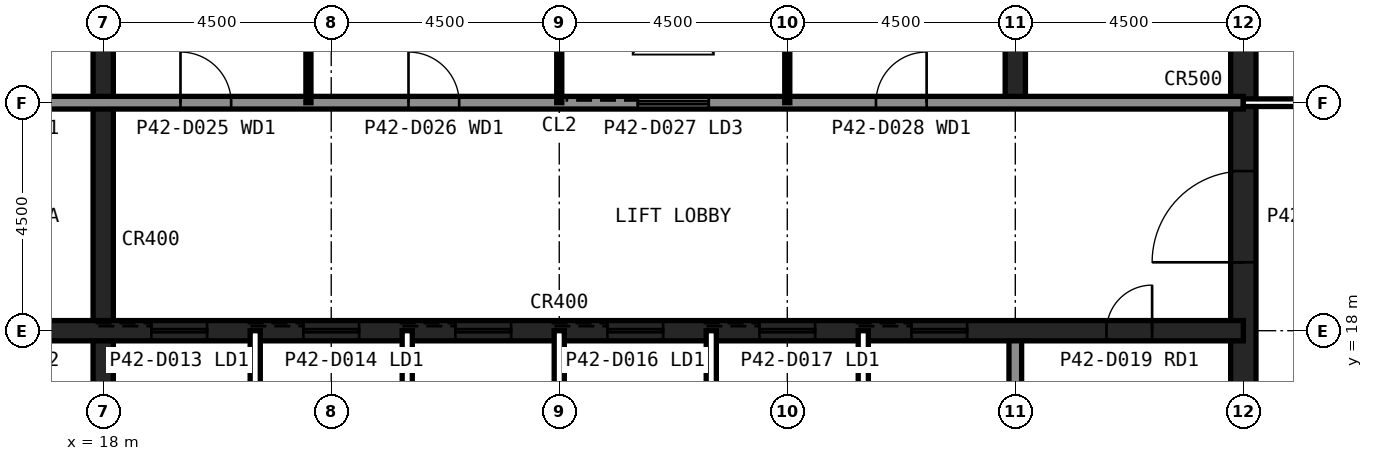
"""IFC4 building model, lengths in metres.
Left out: names, types, materials, properties, quantities, classifications, styles, units other than length and angle.
Written with IfcOpenShell. Run it as: python <this file> out.ifc"""

import sys

from ifc_helpers import new_model, si_unit, direction, frame, frame_2d, origin, place, context, subcontext, project, spatial, rectangle, extrude, element, fill, save


model = new_model("IFC4")
c1 = context("Model", 3, precision=1e-05, world=origin(), true_north=direction((0.0, 1.0)))
c2 = subcontext(c1, "Body", "Model", "MODEL_VIEW")
j1 = project(units=[si_unit("LENGTHUNIT", "METRE"), si_unit("PLANEANGLEUNIT", "RADIAN")], contexts=[c1])
p1 = place(None, origin())
s1 = spatial("IfcSite", under=j1, at=p1, CompositionType="ELEMENT")
p2 = place(p1, origin())
s2 = spatial("IfcBuilding", under=s1, at=p2, CompositionType="ELEMENT")
p3 = place(p2, frame((0.0, 0.0, 175.6)))
s3 = spatial("IfcBuildingStorey", under=s2, at=p3, CompositionType="ELEMENT", Elevation=175.6)
p4 = place(p3, frame((40.5, 13.5, 0.0), z_axis=(0.0, 0.0, 1.0), x_axis=(0.0, 1.0, 0.0)))
e1 = element("IfcWall", 1, at=p4, inside=s3, PredefinedType="SHEAR", context=c2, shape_type="SweptSolid", body=[
    extrude(rectangle(XDim=27.0, YDim=0.5, at=frame_2d((13.5, 0.0))), origin(), (0.0, 0.0, 1.0), 4.0),
])
p5 = place(p4, frame((5.85, 0.0, 0.0)))
e2 = element("IfcOpeningElement", 2, at=p5, cuts=e1, PredefinedType="OPENING", context=c2, shape_type="SweptSolid", body=[
    extrude(rectangle(XDim=1.8, YDim=2.1, at=frame_2d((0.9, 1.05))), frame((0.0, 0.26, 0.0), z_axis=(0.0, -1.0, 0.0), x_axis=(1.0, 0.0, 0.0)), (0.0, 0.0, 1.0), 0.52),
])
p6 = place(p4, frame((19.65, 0.0, 0.0)))
e3 = element("IfcOpeningElement", 3, at=p6, cuts=e1, PredefinedType="OPENING", context=c2, shape_type="SweptSolid", body=[
    extrude(rectangle(XDim=1.2, YDim=2.1, at=frame_2d((0.6, 1.05))), frame((0.0, 0.26, 0.0), z_axis=(0.0, -1.0, 0.0), x_axis=(1.0, 0.0, 0.0)), (0.0, 0.0, 1.0), 0.52),
])
p7 = place(p3, frame((18.0, 13.5, 0.0), z_axis=(0.0, 0.0, 1.0), x_axis=(0.0, 1.0, 0.0)))
e4 = element("IfcWall", 4, at=p7, inside=s3, PredefinedType="SHEAR", context=c2, shape_type="SweptSolid", body=[
    extrude(rectangle(XDim=18.0, YDim=0.4, at=frame_2d((9.0, 0.0))), origin(), (0.0, 0.0, 1.0), 4.0),
])
p8 = place(p3, frame((36.0, 13.5, 0.0), z_axis=(0.0, 0.0, 1.0), x_axis=(0.0, 1.0, 0.0)))
e5 = element("IfcWall", 5, at=p8, inside=s3, PredefinedType="SOLIDWALL", context=c2, shape_type="SweptSolid", body=[
    extrude(rectangle(XDim=4.5, YDim=0.25, at=frame_2d((2.25, 0.0))), origin(), (0.0, 0.0, 1.0), 3.84),
])
p9 = place(p3, frame((36.0, 22.5, 0.0), z_axis=(0.0, 0.0, 1.0), x_axis=(0.0, 1.0, 0.0)))
e6 = element("IfcWall", 6, at=p9, inside=s3, PredefinedType="SHEAR", context=c2, shape_type="SweptSolid", body=[
    extrude(rectangle(XDim=18.0, YDim=0.4, at=frame_2d((9.0, 0.0))), origin(), (0.0, 0.0, 1.0), 4.0),
])
p10 = place(p3, frame((13.5, 18.0, 0.0), z_axis=(0.0, 0.0, 1.0), x_axis=(1.0, 0.0, 0.0)))
e7 = element("IfcWall", 7, at=p10, inside=s3, PredefinedType="SHEAR", context=c2, shape_type="SweptSolid", body=[
    extrude(rectangle(XDim=27.0, YDim=0.4, at=frame_2d((13.5, 0.0))), origin(), (0.0, 0.0, 1.0), 4.0),
])
p11 = place(p10, frame((24.3, 0.0, 0.0)))
e8 = element("IfcOpeningElement", 8, at=p11, cuts=e7, PredefinedType="OPENING", context=c2, shape_type="SweptSolid", body=[
    extrude(rectangle(XDim=0.9, YDim=2.1, at=frame_2d((0.45, 1.05))), frame((0.0, 0.21, 0.0), z_axis=(0.0, -1.0, 0.0), x_axis=(1.0, 0.0, 0.0)), (0.0, 0.0, 1.0), 0.42),
])
p12 = place(p10, frame((5.45, 0.0, 0.0)))
e9 = element("IfcOpeningElement", 9, at=p12, cuts=e7, PredefinedType="OPENING", context=c2, shape_type="SweptSolid", body=[
    extrude(rectangle(XDim=1.1, YDim=2.1, at=frame_2d((0.55, 1.05))), frame((0.0, 0.21, 0.0), z_axis=(0.0, -1.0, 0.0), x_axis=(1.0, 0.0, 0.0)), (0.0, 0.0, 1.0), 0.42),
])
p13 = place(p10, frame((8.45, 0.0, 0.0)))
e10 = element("IfcOpeningElement", 10, at=p13, cuts=e7, PredefinedType="OPENING", context=c2, shape_type="SweptSolid", body=[
    extrude(rectangle(XDim=1.1, YDim=2.1, at=frame_2d((0.55, 1.05))), frame((0.0, 0.21, 0.0), z_axis=(0.0, -1.0, 0.0), x_axis=(1.0, 0.0, 0.0)), (0.0, 0.0, 1.0), 0.42),
])
p14 = place(p10, frame((11.45, 0.0, 0.0)))
e11 = element("IfcOpeningElement", 11, at=p14, cuts=e7, PredefinedType="OPENING", context=c2, shape_type="SweptSolid", body=[
    extrude(rectangle(XDim=1.1, YDim=2.1, at=frame_2d((0.55, 1.05))), frame((0.0, 0.21, 0.0), z_axis=(0.0, -1.0, 0.0), x_axis=(1.0, 0.0, 0.0)), (0.0, 0.0, 1.0), 0.42),
])
p15 = place(p10, frame((14.45, 0.0, 0.0)))
e12 = element("IfcOpeningElement", 12, at=p15, cuts=e7, PredefinedType="OPENING", context=c2, shape_type="SweptSolid", body=[
    extrude(rectangle(XDim=1.1, YDim=2.1, at=frame_2d((0.55, 1.05))), frame((0.0, 0.21, 0.0), z_axis=(0.0, -1.0, 0.0), x_axis=(1.0, 0.0, 0.0)), (0.0, 0.0, 1.0), 0.42),
])
p16 = place(p10, frame((17.45, 0.0, 0.0)))
e13 = element("IfcOpeningElement", 13, at=p16, cuts=e7, PredefinedType="OPENING", context=c2, shape_type="SweptSolid", body=[
    extrude(rectangle(XDim=1.1, YDim=2.1, at=frame_2d((0.55, 1.05))), frame((0.0, 0.21, 0.0), z_axis=(0.0, -1.0, 0.0), x_axis=(1.0, 0.0, 0.0)), (0.0, 0.0, 1.0), 0.42),
])
p17 = place(p10, frame((20.45, 0.0, 0.0)))
e14 = element("IfcOpeningElement", 14, at=p17, cuts=e7, PredefinedType="OPENING", context=c2, shape_type="SweptSolid", body=[
    extrude(rectangle(XDim=1.1, YDim=2.1, at=frame_2d((0.55, 1.05))), frame((0.0, 0.21, 0.0), z_axis=(0.0, -1.0, 0.0), x_axis=(1.0, 0.0, 0.0)), (0.0, 0.0, 1.0), 0.42),
])
p18 = place(p10, frame((1.6, 0.0, 0.0)))
e15 = element("IfcOpeningElement", 15, at=p18, cuts=e7, PredefinedType="OPENING", context=c2, shape_type="SweptSolid", body=[
    extrude(rectangle(XDim=1.3, YDim=2.2, at=frame_2d((0.65, 1.1))), frame((0.0, 0.21, 0.0), z_axis=(0.0, -1.0, 0.0), x_axis=(1.0, 0.0, 0.0)), (0.0, 0.0, 1.0), 0.42),
])
p19 = place(p3, frame((13.5, 22.5, 0.0), z_axis=(0.0, 0.0, 1.0), x_axis=(1.0, 0.0, 0.0)))
e16 = element("IfcWall", 16, at=p19, inside=s3, PredefinedType="SOLIDWALL", context=c2, shape_type="SweptSolid", body=[
    extrude(rectangle(XDim=27.0, YDim=0.25, at=frame_2d((13.5, 0.0))), origin(), (0.0, 0.0, 1.0), 3.84),
])
p20 = place(p19, frame((1.65, 0.0, 0.0)))
e17 = element("IfcOpeningElement", 17, at=p20, cuts=e16, PredefinedType="OPENING", context=c2, shape_type="SweptSolid", body=[
    extrude(rectangle(XDim=1.2, YDim=2.1, at=frame_2d((0.6, 1.05))), frame((0.0, 0.135, 0.0), z_axis=(0.0, -1.0, 0.0), x_axis=(1.0, 0.0, 0.0)), (0.0, 0.0, 1.0), 0.27),
])
p21 = place(p19, frame((6.025, 0.0, 0.0)))
e18 = element("IfcOpeningElement", 18, at=p21, cuts=e16, PredefinedType="OPENING", context=c2, shape_type="SweptSolid", body=[
    extrude(rectangle(XDim=1.0, YDim=2.1, at=frame_2d((0.5, 1.05))), frame((0.0, 0.135, 0.0), z_axis=(0.0, -1.0, 0.0), x_axis=(1.0, 0.0, 0.0)), (0.0, 0.0, 1.0), 0.27),
])
p22 = place(p19, frame((10.525, 0.0, 0.0)))
e19 = element("IfcOpeningElement", 19, at=p22, cuts=e16, PredefinedType="OPENING", context=c2, shape_type="SweptSolid", body=[
    extrude(rectangle(XDim=1.0, YDim=2.1, at=frame_2d((0.5, 1.05))), frame((0.0, 0.135, 0.0), z_axis=(0.0, -1.0, 0.0), x_axis=(1.0, 0.0, 0.0)), (0.0, 0.0, 1.0), 0.27),
])
p23 = place(p19, frame((19.75, 0.0, 0.0)))
e20 = element("IfcOpeningElement", 20, at=p23, cuts=e16, PredefinedType="OPENING", context=c2, shape_type="SweptSolid", body=[
    extrude(rectangle(XDim=1.0, YDim=2.1, at=frame_2d((0.5, 1.05))), frame((0.0, 0.135, 0.0), z_axis=(0.0, -1.0, 0.0), x_axis=(1.0, 0.0, 0.0)), (0.0, 0.0, 1.0), 0.27),
])
p24 = place(p19, frame((15.05, 0.0, 0.0)))
e21 = element("IfcOpeningElement", 21, at=p24, cuts=e16, PredefinedType="OPENING", context=c2, shape_type="SweptSolid", body=[
    extrude(rectangle(XDim=1.4, YDim=2.4, at=frame_2d((0.7, 1.2))), frame((0.0, 0.135, 0.0), z_axis=(0.0, -1.0, 0.0), x_axis=(1.0, 0.0, 0.0)), (0.0, 0.0, 1.0), 0.27),
])
for number, where, z_axis, x_axis in (
    (22, (21.0, 13.5, 0.0), (0.0, 0.0, 1.0), (0.0, 1.0, 0.0)),
    (23, (24.0, 13.5, 0.0), (0.0, 0.0, 1.0), (0.0, 1.0, 0.0)),
    (24, (27.0, 13.5, 0.0), (0.0, 0.0, 1.0), (0.0, 1.0, 0.0)),
    (25, (30.0, 13.5, 0.0), (0.0, 0.0, 1.0), (0.0, 1.0, 0.0)),
    (26, (33.0, 13.5, 0.0), (0.0, 0.0, 1.0), (0.0, 1.0, 0.0)),
):
    element("IfcWall", number, at=place(p3, frame(where, z_axis=z_axis, x_axis=x_axis)), inside=s3, PredefinedType="PARTITIONING", context=c2, shape_type="SweptSolid", body=[
        extrude(rectangle(XDim=4.5, YDim=0.2, at=frame_2d((2.25, 0.0))), origin(), (0.0, 0.0, 1.0), 3.84),
    ])
for number, where, z_axis, x_axis in (
    (27, (22.05, 22.5, 0.0), (0.0, 0.0, 1.0), (0.0, 1.0, 0.0)),
    (28, (27.0, 22.5, 0.0), (0.0, 0.0, 1.0), (0.0, 1.0, 0.0)),
    (29, (31.5, 22.5, 0.0), (0.0, 0.0, 1.0), (0.0, 1.0, 0.0)),
):
    element("IfcWall", number, at=place(p3, frame(where, z_axis=z_axis, x_axis=x_axis)), inside=s3, PredefinedType="PLUMBINGWALL", context=c2, shape_type="SweptSolid", body=[
        extrude(rectangle(XDim=9.0, YDim=0.1, at=frame_2d((4.5, 0.0))), origin(), (0.0, 0.0, 1.0), 3.84),
    ])
p25 = place(p3, frame((40.5, 22.5, 0.0), z_axis=(0.0, 0.0, 1.0), x_axis=(1.0, 0.0, 0.0)))
e30 = element("IfcWall", 30, at=p25, inside=s3, PredefinedType="PARTITIONING", context=c2, shape_type="SweptSolid", body=[
    extrude(rectangle(XDim=3.0, YDim=0.15, at=frame_2d((1.5, 0.0))), origin(), (0.0, 0.0, 1.0), 2.989),
])
p26 = place(p5, origin())
e31 = element("IfcDoor", 31, at=p26, inside=s3, OperationType="SINGLE_SWING_LEFT", PredefinedType="DOOR", context=c2, shape_type="SweptSolid", body=[
    extrude(rectangle(XDim=1.8, YDim=2.1, at=frame_2d((0.9, 1.05))), frame((0.0, 0.025, 0.0), z_axis=(0.0, -1.0, 0.0), x_axis=(1.0, 0.0, 0.0)), (0.0, 0.0, 1.0), 0.05),
])
fill(e2, e31)
p27 = place(p21, origin())
e32 = element("IfcDoor", 32, at=p27, inside=s3, OperationType="SINGLE_SWING_LEFT", PredefinedType="DOOR", context=c2, shape_type="SweptSolid", body=[
    extrude(rectangle(XDim=1.0, YDim=2.1, at=frame_2d((0.5, 1.05))), frame((0.0, 0.025, 0.0), z_axis=(0.0, -1.0, 0.0), x_axis=(1.0, 0.0, 0.0)), (0.0, 0.0, 1.0), 0.05),
])
fill(e18, e32)
p28 = place(p22, origin())
e33 = element("IfcDoor", 33, at=p28, inside=s3, OperationType="SINGLE_SWING_LEFT", PredefinedType="DOOR", context=c2, shape_type="SweptSolid", body=[
    extrude(rectangle(XDim=1.0, YDim=2.1, at=frame_2d((0.5, 1.05))), frame((0.0, 0.025, 0.0), z_axis=(0.0, -1.0, 0.0), x_axis=(1.0, 0.0, 0.0)), (0.0, 0.0, 1.0), 0.05),
])
fill(e19, e33)
p29 = place(p23, origin())
e34 = element("IfcDoor", 34, at=p29, inside=s3, OperationType="SINGLE_SWING_RIGHT", PredefinedType="DOOR", context=c2, shape_type="SweptSolid", body=[
    extrude(rectangle(XDim=1.0, YDim=2.1, at=frame_2d((0.5, 1.05))), frame((0.0, 0.025, 0.0), z_axis=(0.0, -1.0, 0.0), x_axis=(1.0, 0.0, 0.0)), (0.0, 0.0, 1.0), 0.05),
])
fill(e20, e34)
p30 = place(p11, origin())
e35 = element("IfcDoor", 35, at=p30, inside=s3, OperationType="SINGLE_SWING_RIGHT", PredefinedType="DOOR", context=c2, shape_type="SweptSolid", body=[
    extrude(rectangle(XDim=0.9, YDim=2.1, at=frame_2d((0.45, 1.05))), frame((0.0, 0.025, 0.0), z_axis=(0.0, -1.0, 0.0), x_axis=(1.0, 0.0, 0.0)), (0.0, 0.0, 1.0), 0.05),
])
fill(e8, e35)
p31 = place(p12, origin())
e36 = element("IfcDoor", 36, at=p31, inside=s3, OperationType="SLIDING_TO_LEFT", PredefinedType="DOOR", context=c2, shape_type="SweptSolid", body=[
    extrude(rectangle(XDim=1.1, YDim=2.1, at=frame_2d((0.55, 1.05))), frame((0.0, 0.025, 0.0), z_axis=(0.0, -1.0, 0.0), x_axis=(1.0, 0.0, 0.0)), (0.0, 0.0, 1.0), 0.05),
])
fill(e9, e36)
p32 = place(p13, origin())
e37 = element("IfcDoor", 37, at=p32, inside=s3, OperationType="SLIDING_TO_LEFT", PredefinedType="DOOR", context=c2, shape_type="SweptSolid", body=[
    extrude(rectangle(XDim=1.1, YDim=2.1, at=frame_2d((0.55, 1.05))), frame((0.0, 0.025, 0.0), z_axis=(0.0, -1.0, 0.0), x_axis=(1.0, 0.0, 0.0)), (0.0, 0.0, 1.0), 0.05),
])
fill(e10, e37)
p33 = place(p14, origin())
e38 = element("IfcDoor", 38, at=p33, inside=s3, OperationType="SLIDING_TO_LEFT", PredefinedType="DOOR", context=c2, shape_type="SweptSolid", body=[
    extrude(rectangle(XDim=1.1, YDim=2.1, at=frame_2d((0.55, 1.05))), frame((0.0, 0.025, 0.0), z_axis=(0.0, -1.0, 0.0), x_axis=(1.0, 0.0, 0.0)), (0.0, 0.0, 1.0), 0.05),
])
fill(e11, e38)
p34 = place(p15, origin())
e39 = element("IfcDoor", 39, at=p34, inside=s3, OperationType="SLIDING_TO_LEFT", PredefinedType="DOOR", context=c2, shape_type="SweptSolid", body=[
    extrude(rectangle(XDim=1.1, YDim=2.1, at=frame_2d((0.55, 1.05))), frame((0.0, 0.025, 0.0), z_axis=(0.0, -1.0, 0.0), x_axis=(1.0, 0.0, 0.0)), (0.0, 0.0, 1.0), 0.05),
])
fill(e12, e39)
p35 = place(p16, origin())
e40 = element("IfcDoor", 40, at=p35, inside=s3, OperationType="SLIDING_TO_LEFT", PredefinedType="DOOR", context=c2, shape_type="SweptSolid", body=[
    extrude(rectangle(XDim=1.1, YDim=2.1, at=frame_2d((0.55, 1.05))), frame((0.0, 0.025, 0.0), z_axis=(0.0, -1.0, 0.0), x_axis=(1.0, 0.0, 0.0)), (0.0, 0.0, 1.0), 0.05),
])
fill(e13, e40)
p36 = place(p17, origin())
e41 = element("IfcDoor", 41, at=p36, inside=s3, OperationType="SLIDING_TO_LEFT", PredefinedType="DOOR", context=c2, shape_type="SweptSolid", body=[
    extrude(rectangle(XDim=1.1, YDim=2.1, at=frame_2d((0.55, 1.05))), frame((0.0, 0.025, 0.0), z_axis=(0.0, -1.0, 0.0), x_axis=(1.0, 0.0, 0.0)), (0.0, 0.0, 1.0), 0.05),
])
fill(e14, e41)
p37 = place(p24, origin())
e42 = element("IfcDoor", 42, at=p37, inside=s3, OperationType="SLIDING_TO_LEFT", PredefinedType="DOOR", context=c2, shape_type="SweptSolid", body=[
    extrude(rectangle(XDim=1.4, YDim=2.4, at=frame_2d((0.7, 1.2))), frame((0.0, 0.025, 0.0), z_axis=(0.0, -1.0, 0.0), x_axis=(1.0, 0.0, 0.0)), (0.0, 0.0, 1.0), 0.05),
])
fill(e21, e42)
save(model, sys.argv[1])
